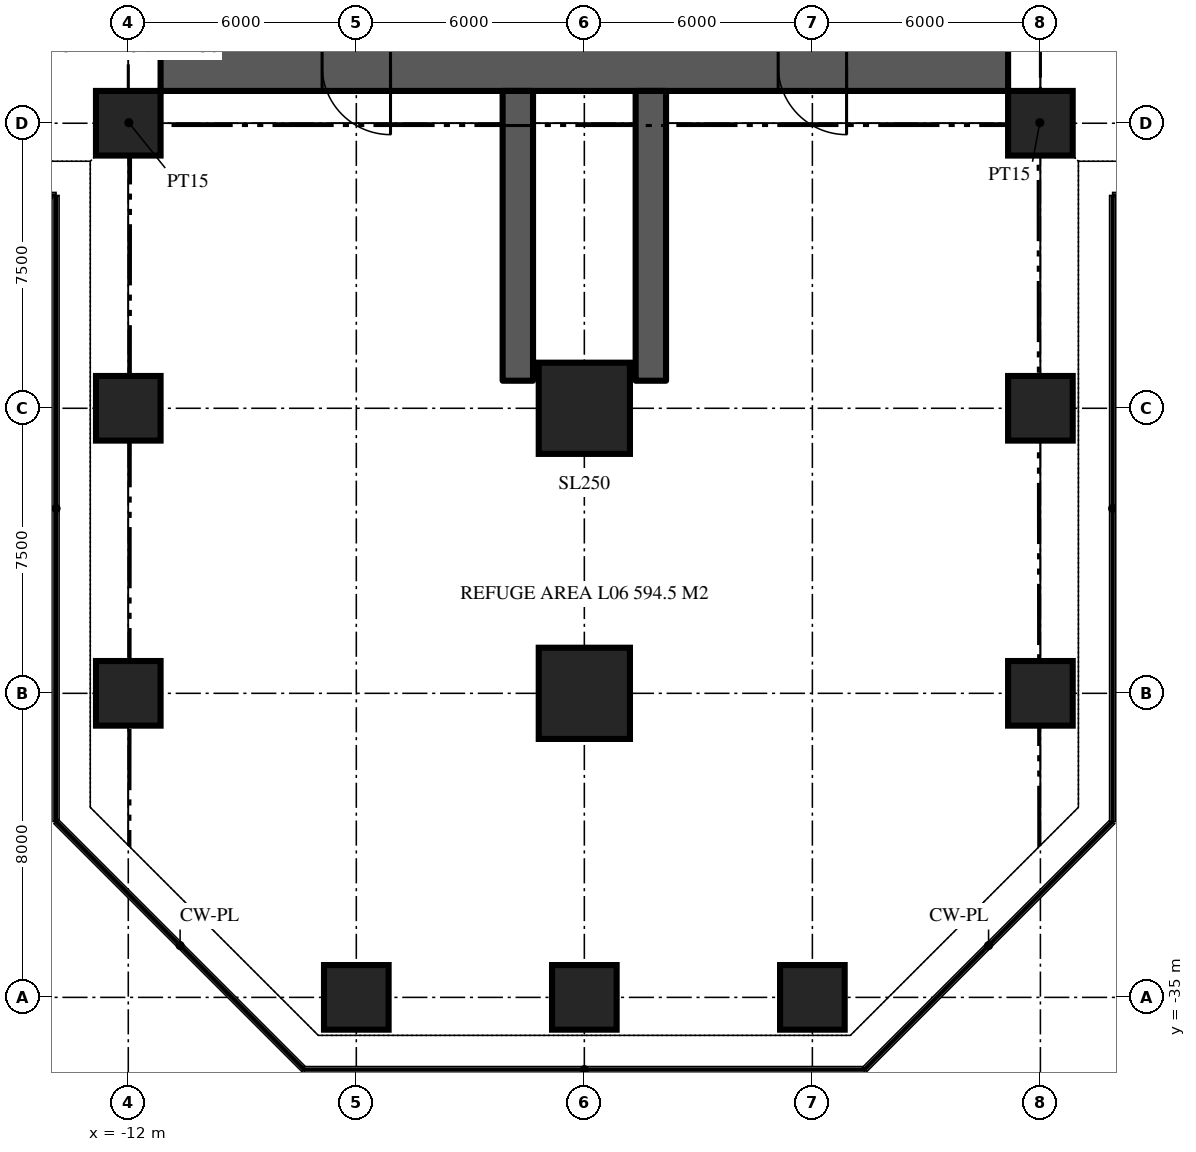
"""IFC4 building model, lengths in metres.
Left out: names, types, materials, properties, quantities, classifications, styles, units other than length and angle.
Written with IfcOpenShell. Run it as: python <this file> out.ifc"""

import sys

from ifc_helpers import new_model, si_unit, direction, frame, frame_2d, origin, origin_2d, place, context, subcontext, project, spatial, rectangle, extrude, element, fill, save


model = new_model("IFC4")
c1 = context("Model", 3, precision=1e-05, world=origin(), true_north=direction((0.0, 1.0)))
c2 = subcontext(c1, "Body", "Model", "MODEL_VIEW")
j1 = project(units=[si_unit("LENGTHUNIT", "METRE"), si_unit("PLANEANGLEUNIT", "RADIAN")], contexts=[c1])
p1 = place(None, origin())
s1 = spatial("IfcSite", under=j1, at=p1, CompositionType="ELEMENT")
p2 = place(p1, origin())
s2 = spatial("IfcBuilding", under=s1, at=p2, CompositionType="ELEMENT")
p3 = place(p2, frame((0.0, 0.0, 37.5)))
s3 = spatial("IfcBuildingStorey", under=s2, at=p3, CompositionType="ELEMENT", Elevation=37.5)
p4 = place(p3, frame((11.15, -10.5, 0.0), z_axis=(0.0, 0.0, 1.0), x_axis=(-1.0, 0.0, 0.0)))
e1 = element("IfcWall", 1, at=p4, inside=s3, PredefinedType="SHEAR", context=c2, shape_type="SweptSolid", body=[
    extrude(rectangle(XDim=22.3, YDim=1.3, at=frame_2d((11.15, 0.0))), origin(), (0.0, 0.0, 1.0), 6.0),
])
p5 = place(p4, frame((16.25, 0.0, 0.0)))
e2 = element("IfcOpeningElement", 2, at=p5, cuts=e1, PredefinedType="OPENING", context=c2, shape_type="SweptSolid", body=[
    extrude(rectangle(XDim=1.8, YDim=2.2, at=frame_2d((0.9, 1.1))), frame((0.0, 0.66, 0.0), z_axis=(0.0, -1.0, 0.0), x_axis=(1.0, 0.0, 0.0)), (0.0, 0.0, 1.0), 1.32),
])
p6 = place(p4, frame((4.25, 0.0, 0.0)))
e3 = element("IfcOpeningElement", 3, at=p6, cuts=e1, PredefinedType="OPENING", context=c2, shape_type="SweptSolid", body=[
    extrude(rectangle(XDim=1.8, YDim=2.2, at=frame_2d((0.9, 1.1))), frame((0.0, 0.66, 0.0), z_axis=(0.0, -1.0, 0.0), x_axis=(1.0, 0.0, 0.0)), (0.0, 0.0, 1.0), 1.32),
])
for number, where, z_axis, x_axis in (
    (4, (-1.75, -11.15, 0.0), (0.0, 0.0, 1.0), (0.0, -1.0, 0.0)),
    (5, (1.75, -11.15, 0.0), (0.0, 0.0, 1.0), (0.0, -1.0, 0.0)),
):
    element("IfcWall", number, at=place(p3, frame(where, z_axis=z_axis, x_axis=x_axis)), inside=s3, PredefinedType="SHEAR", context=c2, shape_type="SweptSolid", body=[
        extrude(rectangle(XDim=7.625, YDim=0.8, at=frame_2d((3.812, 0.0))), origin(), (0.0, 0.0, 1.0), 6.0),
    ])
for number, where, z_axis, x_axis in (
    (6, (-6.0, -35.0, 0.0), (0.0, 0.0, 1.0), (1.0, 0.0, 0.0)),
    (7, (0.0, -35.0, 0.0), (0.0, 0.0, 1.0), (1.0, 0.0, 0.0)),
    (8, (6.0, -35.0, 0.0), (0.0, 0.0, 1.0), (1.0, 0.0, 0.0)),
    (9, (-12.0, -27.0, 0.0), (0.0, 0.0, 1.0), (1.0, 0.0, 0.0)),
):
    element("IfcColumn", number, at=place(p3, frame(where, z_axis=z_axis, x_axis=x_axis)), inside=s3, PredefinedType="COLUMN", context=c2, shape_type="SweptSolid", body=[
        extrude(rectangle(XDim=1.7, YDim=1.7, at=origin_2d()), origin(), (0.0, 0.0, 1.0), 6.0),
    ])
p7 = place(p3, frame((0.0, -27.0, 0.0), z_axis=(0.0, 0.0, 1.0), x_axis=(1.0, 0.0, 0.0)))
e10 = element("IfcColumn", 10, at=p7, inside=s3, PredefinedType="COLUMN", context=c2, shape_type="SweptSolid", body=[
    extrude(rectangle(XDim=2.4, YDim=2.4, at=origin_2d()), origin(), (0.0, 0.0, 1.0), 6.0),
])
for number, where, z_axis, x_axis in (
    (11, (12.0, -27.0, 0.0), (0.0, 0.0, 1.0), (1.0, 0.0, 0.0)),
    (12, (-12.0, -19.5, 0.0), (0.0, 0.0, 1.0), (1.0, 0.0, 0.0)),
):
    element("IfcColumn", number, at=place(p3, frame(where, z_axis=z_axis, x_axis=x_axis)), inside=s3, PredefinedType="COLUMN", context=c2, shape_type="SweptSolid", body=[
        extrude(rectangle(XDim=1.7, YDim=1.7, at=origin_2d()), origin(), (0.0, 0.0, 1.0), 6.0),
    ])
p8 = place(p3, frame((0.0, -19.5, 0.0), z_axis=(0.0, 0.0, 1.0), x_axis=(1.0, 0.0, 0.0)))
e13 = element("IfcColumn", 13, at=p8, inside=s3, PredefinedType="COLUMN", context=c2, shape_type="SweptSolid", body=[
    extrude(rectangle(XDim=2.4, YDim=2.4, at=origin_2d()), origin(), (0.0, 0.0, 1.0), 6.0),
])
for number, where, z_axis, x_axis in (
    (14, (12.0, -19.5, 0.0), (0.0, 0.0, 1.0), (1.0, 0.0, 0.0)),
    (15, (-12.0, -12.0, 0.0), (0.0, 0.0, 1.0), (1.0, 0.0, 0.0)),
    (16, (12.0, -12.0, 0.0), (0.0, 0.0, 1.0), (1.0, 0.0, 0.0)),
):
    element("IfcColumn", number, at=place(p3, frame(where, z_axis=z_axis, x_axis=x_axis)), inside=s3, PredefinedType="COLUMN", context=c2, shape_type="SweptSolid", body=[
        extrude(rectangle(XDim=1.7, YDim=1.7, at=origin_2d()), origin(), (0.0, 0.0, 1.0), 6.0),
    ])
for number, where, z_axis, x_axis in (
    (17, (-11.15, -11.15, 0.0), (0.0, 0.0, 1.0), (-0.707, -0.707, 0.0)),
    (18, (11.15, -11.15, 0.0), (0.0, 0.0, 1.0), (0.707, -0.707, 0.0)),
):
    element("IfcWall", number, at=place(p3, frame(where, z_axis=z_axis, x_axis=x_axis)), inside=s3, PredefinedType="PARTITIONING", context=c2, shape_type="SweptSolid", body=[
        extrude(rectangle(XDim=2.362, YDim=0.15, at=frame_2d((1.181, 0.0))), origin(), (0.0, 0.0, 1.0), 5.32),
    ])
p9 = place(p5, origin())
e19 = element("IfcDoor", 19, at=p9, inside=s3, OperationType="DOUBLE_DOOR_DOUBLE_SWING", PredefinedType="DOOR", context=c2, shape_type="SweptSolid", body=[
    extrude(rectangle(XDim=1.8, YDim=2.2, at=frame_2d((0.9, 1.1))), frame((0.0, 0.025, 0.0), z_axis=(0.0, -1.0, 0.0), x_axis=(1.0, 0.0, 0.0)), (0.0, 0.0, 1.0), 0.05),
])
fill(e2, e19)
p10 = place(p6, origin())
e20 = element("IfcDoor", 20, at=p10, inside=s3, OperationType="DOUBLE_DOOR_DOUBLE_SWING", PredefinedType="DOOR", context=c2, shape_type="SweptSolid", body=[
    extrude(rectangle(XDim=1.8, YDim=2.2, at=frame_2d((0.9, 1.1))), frame((0.0, 0.025, 0.0), z_axis=(0.0, -1.0, 0.0), x_axis=(1.0, 0.0, 0.0)), (0.0, 0.0, 1.0), 0.05),
])
fill(e3, e20)
save(model, sys.argv[1])
